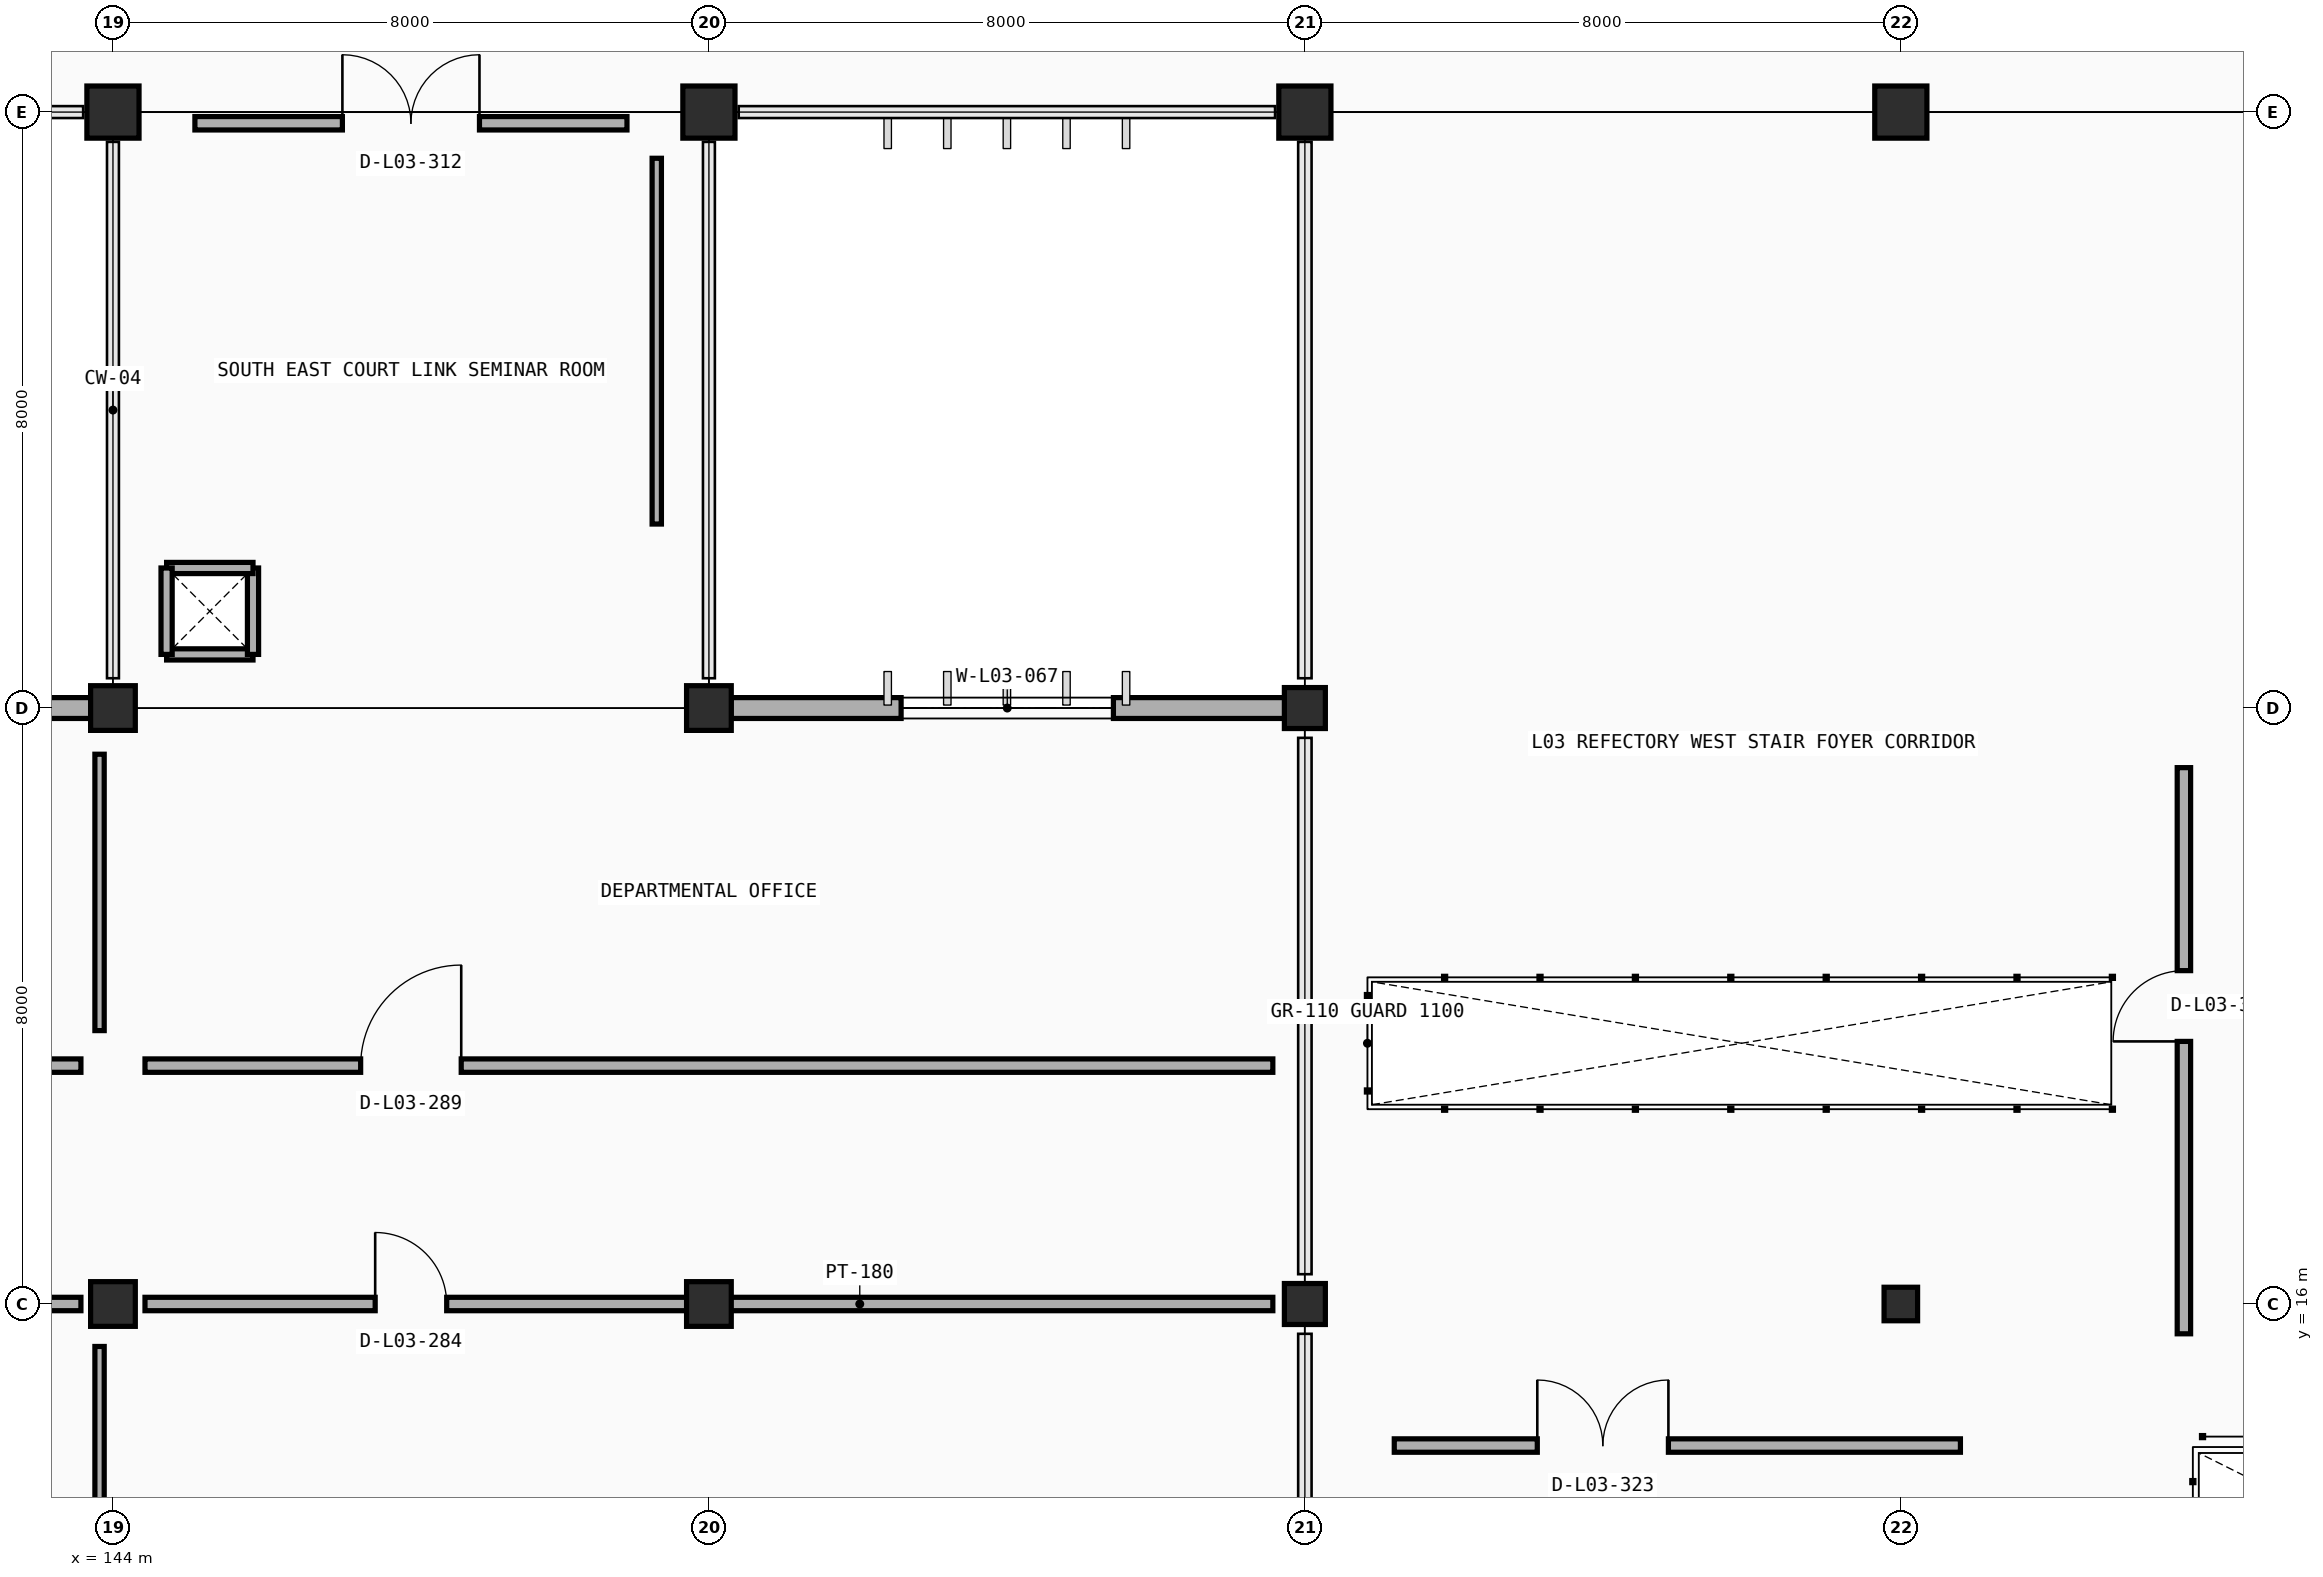
"""IFC4 building model, lengths in metres.
Left out: names, types, materials, properties, quantities, classifications, styles, units other than length and angle.
Written with IfcOpenShell. Run it as: python <this file> out.ifc"""

import sys

from ifc_helpers import new_model, si_unit, direction, frame, frame_2d, origin, origin_2d, place, context, subcontext, project, spatial, rectangle, extrude, element, fill, save


model = new_model("IFC4")
c1 = context("Model", 3, precision=1e-05, world=origin(), true_north=direction((0.0, 1.0)))
c2 = subcontext(c1, "Body", "Model", "MODEL_VIEW")
j1 = project(units=[si_unit("LENGTHUNIT", "METRE"), si_unit("PLANEANGLEUNIT", "RADIAN")], contexts=[c1])
p1 = place(None, origin())
s1 = spatial("IfcSite", under=j1, at=p1, CompositionType="ELEMENT")
p2 = place(p1, origin())
s2 = spatial("IfcBuilding", under=s1, at=p2, CompositionType="ELEMENT")
p3 = place(p2, frame((0.0, 0.0, 9.6)))
s3 = spatial("IfcBuildingStorey", under=s2, at=p3, CompositionType="ELEMENT", Elevation=9.6)
for number, where, z_axis, x_axis in (
    (1, (144.0, 16.0, 0.0), (0.0, 0.0, 1.0), (1.0, 0.0, 0.0)),
    (2, (152.0, 16.0, 0.0), (0.0, 0.0, 1.0), (1.0, 0.0, 0.0)),
):
    element("IfcColumn", number, at=place(p3, frame(where, z_axis=z_axis, x_axis=x_axis)), inside=s3, PredefinedType="COLUMN", context=c2, shape_type="SweptSolid", body=[
        extrude(rectangle(XDim=0.6, YDim=0.6, at=origin_2d()), origin(), (0.0, 0.0, 1.0), 4.2),
    ])
p4 = place(p3, frame((160.0, 16.0, 0.0), z_axis=(0.0, 0.0, 1.0), x_axis=(1.0, 0.0, 0.0)))
e3 = element("IfcColumn", 3, at=p4, inside=s3, PredefinedType="COLUMN", context=c2, shape_type="SweptSolid", body=[
    extrude(rectangle(XDim=0.55, YDim=0.55, at=origin_2d()), origin(), (0.0, 0.0, 1.0), 4.2),
])
p5 = place(p3, frame((168.0, 16.0, 0.0), z_axis=(0.0, 0.0, 1.0), x_axis=(1.0, 0.0, 0.0)))
e4 = element("IfcColumn", 4, at=p5, inside=s3, PredefinedType="COLUMN", context=c2, shape_type="SweptSolid", body=[
    extrude(rectangle(XDim=0.45, YDim=0.45, at=origin_2d()), origin(), (0.0, 0.0, 1.0), 4.2),
])
for number, where, z_axis, x_axis in (
    (5, (144.0, 24.0, 0.0), (0.0, 0.0, 1.0), (1.0, 0.0, 0.0)),
    (6, (152.0, 24.0, 0.0), (0.0, 0.0, 1.0), (1.0, 0.0, 0.0)),
):
    element("IfcColumn", number, at=place(p3, frame(where, z_axis=z_axis, x_axis=x_axis)), inside=s3, PredefinedType="COLUMN", context=c2, shape_type="SweptSolid", body=[
        extrude(rectangle(XDim=0.6, YDim=0.6, at=origin_2d()), origin(), (0.0, 0.0, 1.0), 4.2),
    ])
p6 = place(p3, frame((160.0, 24.0, 0.0), z_axis=(0.0, 0.0, 1.0), x_axis=(1.0, 0.0, 0.0)))
e7 = element("IfcColumn", 7, at=p6, inside=s3, PredefinedType="COLUMN", context=c2, shape_type="SweptSolid", body=[
    extrude(rectangle(XDim=0.55, YDim=0.55, at=origin_2d()), origin(), (0.0, 0.0, 1.0), 4.2),
])
for number, where, z_axis, x_axis in (
    (8, (144.0, 32.0, 0.0), (0.0, 0.0, 1.0), (1.0, 0.0, 0.0)),
    (9, (152.0, 32.0, 0.0), (0.0, 0.0, 1.0), (1.0, 0.0, 0.0)),
    (10, (160.0, 32.0, 0.0), (0.0, 0.0, 1.0), (1.0, 0.0, 0.0)),
    (11, (168.0, 32.0, 0.0), (0.0, 0.0, 1.0), (1.0, 0.0, 0.0)),
):
    element("IfcColumn", number, at=place(p3, frame(where, z_axis=z_axis, x_axis=x_axis)), inside=s3, PredefinedType="COLUMN", context=c2, shape_type="SweptSolid", body=[
        extrude(rectangle(XDim=0.7, YDim=0.7, at=origin_2d()), origin(), (0.0, 0.0, 1.0), 4.2),
    ])
p7 = place(p3, frame((136.297, 24.0, 0.0), z_axis=(0.0, 0.0, 1.0), x_axis=(1.0, 0.0, 0.0)))
e12 = element("IfcWall", 12, at=p7, inside=s3, PredefinedType="STANDARD", context=c2, shape_type="SweptSolid", body=[
    extrude(rectangle(XDim=7.406, YDim=0.28, at=frame_2d((3.703, 0.0))), origin(), (0.0, 0.0, 1.0), 3.325),
])
p8 = place(p7, frame((2.283, 0.0, 0.9)))
e13 = element("IfcOpeningElement", 13, at=p8, cuts=e12, PredefinedType="OPENING", context=c2, shape_type="SweptSolid", body=[
    extrude(rectangle(XDim=1.25, YDim=1.4, at=frame_2d((0.625, 0.7))), frame((0.0, 0.15, 0.0), z_axis=(0.0, -1.0, 0.0), x_axis=(1.0, 0.0, 0.0)), (0.0, 0.0, 1.0), 0.3),
])
p9 = place(p3, frame((152.297, 24.0, 0.0), z_axis=(0.0, 0.0, 1.0), x_axis=(1.0, 0.0, 0.0)))
e14 = element("IfcWall", 14, at=p9, inside=s3, PredefinedType="STANDARD", context=c2, shape_type="SweptSolid", body=[
    extrude(rectangle(XDim=7.431, YDim=0.28, at=frame_2d((3.715, 0.0))), origin(), (0.0, 0.0, 1.0), 3.325),
])
p10 = place(p9, frame((2.283, 0.0, 0.9)))
e15 = element("IfcOpeningElement", 15, at=p10, cuts=e14, PredefinedType="OPENING", context=c2, shape_type="SweptSolid", body=[
    extrude(rectangle(XDim=2.85, YDim=1.25, at=frame_2d((1.425, 0.625))), frame((0.0, 0.15, 0.0), z_axis=(0.0, -1.0, 0.0), x_axis=(1.0, 0.0, 0.0)), (0.0, 0.0, 1.0), 0.3),
])
for number, where, z_axis, x_axis in (
    (16, (144.72, 24.72, 0.0), (0.0, 0.0, 1.0), (1.0, 0.0, 0.0)),
    (17, (145.88, 24.72, 0.0), (0.0, 0.0, 1.0), (0.0, 1.0, 0.0)),
    (18, (145.88, 25.88, 0.0), (0.0, 0.0, 1.0), (-1.0, 0.0, 0.0)),
    (19, (144.72, 25.88, 0.0), (0.0, 0.0, 1.0), (0.0, -1.0, 0.0)),
):
    element("IfcWall", number, at=place(p3, frame(where, z_axis=z_axis, x_axis=x_axis)), inside=s3, PredefinedType="PARTITIONING", context=c2, shape_type="SweptSolid", body=[
        extrude(rectangle(XDim=1.16, YDim=0.15, at=frame_2d((0.58, 0.0))), origin(), (0.0, 0.0, 1.0), 3.9),
    ])
p11 = place(p3, frame((120.43, 16.0, 0.0), z_axis=(0.0, 0.0, 1.0), x_axis=(1.0, 0.0, 0.0)))
e20 = element("IfcWall", 20, at=p11, inside=s3, PredefinedType="PARTITIONING", context=c2, shape_type="SweptSolid", body=[
    extrude(rectangle(XDim=23.14, YDim=0.18, at=frame_2d((11.57, 0.0))), origin(), (0.0, 0.0, 1.0), 3.275),
])
p12 = place(p11, frame((2.66, 0.0, 0.0)))
e21 = element("IfcOpeningElement", 21, at=p12, cuts=e20, PredefinedType="OPENING", context=c2, shape_type="SweptSolid", body=[
    extrude(rectangle(XDim=1.82, YDim=2.25, at=frame_2d((0.91, 1.125))), frame((0.0, 0.1, 0.0), z_axis=(0.0, -1.0, 0.0), x_axis=(1.0, 0.0, 0.0)), (0.0, 0.0, 1.0), 0.2),
])
p13 = place(p3, frame((143.82, 8.62, 0.0), z_axis=(0.0, 0.0, 1.0), x_axis=(0.0, 1.0, 0.0)))
e22 = element("IfcWall", 22, at=p13, inside=s3, PredefinedType="PARTITIONING", context=c2, shape_type="SweptSolid", body=[
    extrude(rectangle(XDim=6.81, YDim=0.125, at=frame_2d((3.405, 0.0))), origin(), (0.0, 0.0, 1.0), 3.225),
])
p14 = place(p3, frame((144.43, 16.0, 0.0), z_axis=(0.0, 0.0, 1.0), x_axis=(1.0, 0.0, 0.0)))
e23 = element("IfcWall", 23, at=p14, inside=s3, PredefinedType="PARTITIONING", context=c2, shape_type="SweptSolid", body=[
    extrude(rectangle(XDim=15.14, YDim=0.18, at=frame_2d((7.57, 0.0))), origin(), (0.0, 0.0, 1.0), 3.275),
])
p15 = place(p14, frame((3.09, 0.0, 0.0)))
e24 = element("IfcOpeningElement", 24, at=p15, cuts=e23, PredefinedType="OPENING", context=c2, shape_type="SweptSolid", body=[
    extrude(rectangle(XDim=0.96, YDim=2.15, at=frame_2d((0.48, 1.075))), frame((0.0, 0.1, 0.0), z_axis=(0.0, -1.0, 0.0), x_axis=(1.0, 0.0, 0.0)), (0.0, 0.0, 1.0), 0.2),
])
p16 = place(p3, frame((120.43, 19.2, 0.0), z_axis=(0.0, 0.0, 1.0), x_axis=(1.0, 0.0, 0.0)))
e25 = element("IfcWall", 25, at=p16, inside=s3, PredefinedType="PARTITIONING", context=c2, shape_type="SweptSolid", body=[
    extrude(rectangle(XDim=23.14, YDim=0.18, at=frame_2d((11.57, 0.0))), origin(), (0.0, 0.0, 1.0), 3.3),
])
p17 = place(p16, frame((2.74, 0.0, 0.0)))
e26 = element("IfcOpeningElement", 26, at=p17, cuts=e25, PredefinedType="OPENING", context=c2, shape_type="SweptSolid", body=[
    extrude(rectangle(XDim=1.66, YDim=2.22, at=frame_2d((0.83, 1.11))), frame((0.0, 0.1, 0.0), z_axis=(0.0, -1.0, 0.0), x_axis=(1.0, 0.0, 0.0)), (0.0, 0.0, 1.0), 0.2),
])
p18 = place(p3, frame((143.82, 19.67, 0.0), z_axis=(0.0, 0.0, 1.0), x_axis=(0.0, 1.0, 0.0)))
e27 = element("IfcWall", 27, at=p18, inside=s3, PredefinedType="PARTITIONING", context=c2, shape_type="SweptSolid", body=[
    extrude(rectangle(XDim=3.71, YDim=0.125, at=frame_2d((1.855, 0.0))), origin(), (0.0, 0.0, 1.0), 3.225),
])
p19 = place(p3, frame((144.43, 19.2, 0.0), z_axis=(0.0, 0.0, 1.0), x_axis=(1.0, 0.0, 0.0)))
e28 = element("IfcWall", 28, at=p19, inside=s3, PredefinedType="PARTITIONING", context=c2, shape_type="SweptSolid", body=[
    extrude(rectangle(XDim=15.14, YDim=0.18, at=frame_2d((7.57, 0.0))), origin(), (0.0, 0.0, 1.0), 3.3),
])
p20 = place(p19, frame((2.895, 0.0, 0.0)))
e29 = element("IfcOpeningElement", 29, at=p20, cuts=e28, PredefinedType="OPENING", context=c2, shape_type="SweptSolid", body=[
    extrude(rectangle(XDim=1.35, YDim=2.2, at=frame_2d((0.675, 1.1))), frame((0.0, 0.1, 0.0), z_axis=(0.0, -1.0, 0.0), x_axis=(1.0, 0.0, 0.0)), (0.0, 0.0, 1.0), 0.2),
])
p21 = place(p3, frame((145.1, 31.85, 0.0), z_axis=(0.0, 0.0, 1.0), x_axis=(1.0, 0.0, 0.0)))
e30 = element("IfcWall", 30, at=p21, inside=s3, PredefinedType="PARTITIONING", context=c2, shape_type="SweptSolid", body=[
    extrude(rectangle(XDim=5.8, YDim=0.18, at=frame_2d((2.9, 0.0))), origin(), (0.0, 0.0, 1.0), 3.3),
])
p22 = place(p21, frame((1.98, 0.0, 0.0)))
e31 = element("IfcOpeningElement", 31, at=p22, cuts=e30, PredefinedType="OPENING", context=c2, shape_type="SweptSolid", body=[
    extrude(rectangle(XDim=1.84, YDim=2.25, at=frame_2d((0.92, 1.125))), frame((0.0, 0.1, 0.0), z_axis=(0.0, -1.0, 0.0), x_axis=(1.0, 0.0, 0.0)), (0.0, 0.0, 1.0), 0.2),
])
p23 = place(p3, frame((151.3, 26.47, 0.0), z_axis=(0.0, 0.0, 1.0), x_axis=(0.0, 1.0, 0.0)))
e32 = element("IfcWall", 32, at=p23, inside=s3, PredefinedType="PARTITIONING", context=c2, shape_type="SweptSolid", body=[
    extrude(rectangle(XDim=4.91, YDim=0.125, at=frame_2d((2.455, 0.0))), origin(), (0.0, 0.0, 1.0), 3.3),
])
p24 = place(p3, frame((171.8, 15.6, 0.0), z_axis=(0.0, 0.0, 1.0), x_axis=(0.0, 1.0, 0.0)))
e33 = element("IfcWall", 33, at=p24, inside=s3, PredefinedType="PARTITIONING", context=c2, shape_type="SweptSolid", body=[
    extrude(rectangle(XDim=7.6, YDim=0.18, at=frame_2d((3.8, 0.0))), origin(), (0.0, 0.0, 1.0), 3.3),
])
p25 = place(p24, frame((3.925, 0.0, 0.0)))
e34 = element("IfcOpeningElement", 34, at=p25, cuts=e33, PredefinedType="OPENING", context=c2, shape_type="SweptSolid", body=[
    extrude(rectangle(XDim=0.95, YDim=2.1, at=frame_2d((0.475, 1.05))), frame((0.0, 0.1, 0.0), z_axis=(0.0, -1.0, 0.0), x_axis=(1.0, 0.0, 0.0)), (0.0, 0.0, 1.0), 0.2),
])
p26 = place(p3, frame((161.2, 14.1, 0.0), z_axis=(0.0, 0.0, 1.0), x_axis=(1.0, 0.0, 0.0)))
e35 = element("IfcWall", 35, at=p26, inside=s3, PredefinedType="PARTITIONING", context=c2, shape_type="SweptSolid", body=[
    extrude(rectangle(XDim=7.6, YDim=0.18, at=frame_2d((3.8, 0.0))), origin(), (0.0, 0.0, 1.0), 3.3),
])
p27 = place(p26, frame((1.92, 0.0, 0.0)))
e36 = element("IfcOpeningElement", 36, at=p27, cuts=e35, PredefinedType="OPENING", context=c2, shape_type="SweptSolid", body=[
    extrude(rectangle(XDim=1.76, YDim=2.25, at=frame_2d((0.88, 1.125))), frame((0.0, 0.1, 0.0), z_axis=(0.0, -1.0, 0.0), x_axis=(1.0, 0.0, 0.0)), (0.0, 0.0, 1.0), 0.2),
])
p28 = place(p10, origin())
e37 = element("IfcWindow", 37, at=p28, inside=s3, PartitioningType="DOUBLE_PANEL_VERTICAL", PredefinedType="WINDOW", context=c2, shape_type="SweptSolid", body=[
    extrude(rectangle(XDim=2.85, YDim=1.25, at=frame_2d((1.425, 0.625))), frame((0.0, 0.03, 0.0), z_axis=(0.0, -1.0, 0.0), x_axis=(1.0, 0.0, 0.0)), (0.0, 0.0, 1.0), 0.06),
])
fill(e15, e37)
p29 = place(p15, origin())
e38 = element("IfcDoor", 38, at=p29, inside=s3, OperationType="SINGLE_SWING_LEFT", PredefinedType="DOOR", context=c2, shape_type="SweptSolid", body=[
    extrude(rectangle(XDim=0.96, YDim=2.15, at=frame_2d((0.48, 1.075))), frame((0.0, 0.025, 0.0), z_axis=(0.0, -1.0, 0.0), x_axis=(1.0, 0.0, 0.0)), (0.0, 0.0, 1.0), 0.05),
])
fill(e24, e38)
p30 = place(p20, origin())
e39 = element("IfcDoor", 39, at=p30, inside=s3, OperationType="SINGLE_SWING_RIGHT", PredefinedType="DOOR", context=c2, shape_type="SweptSolid", body=[
    extrude(rectangle(XDim=1.35, YDim=2.2, at=frame_2d((0.675, 1.1))), frame((0.0, 0.025, 0.0), z_axis=(0.0, -1.0, 0.0), x_axis=(1.0, 0.0, 0.0)), (0.0, 0.0, 1.0), 0.05),
])
fill(e29, e39)
p31 = place(p22, origin())
e40 = element("IfcDoor", 40, at=p31, inside=s3, OperationType="DOUBLE_DOOR_SINGLE_SWING", PredefinedType="DOOR", context=c2, shape_type="SweptSolid", body=[
    extrude(rectangle(XDim=1.84, YDim=2.25, at=frame_2d((0.92, 1.125))), frame((0.0, 0.025, 0.0), z_axis=(0.0, -1.0, 0.0), x_axis=(1.0, 0.0, 0.0)), (0.0, 0.0, 1.0), 0.05),
])
fill(e31, e40)
p32 = place(p25, origin())
e41 = element("IfcDoor", 41, at=p32, inside=s3, OperationType="SINGLE_SWING_LEFT", PredefinedType="DOOR", context=c2, shape_type="SweptSolid", body=[
    extrude(rectangle(XDim=0.95, YDim=2.1, at=frame_2d((0.475, 1.05))), frame((0.0, 0.025, 0.0), z_axis=(0.0, -1.0, 0.0), x_axis=(1.0, 0.0, 0.0)), (0.0, 0.0, 1.0), 0.05),
])
fill(e34, e41)
p33 = place(p27, origin())
e42 = element("IfcDoor", 42, at=p33, inside=s3, OperationType="DOUBLE_DOOR_SINGLE_SWING", PredefinedType="DOOR", context=c2, shape_type="SweptSolid", body=[
    extrude(rectangle(XDim=1.76, YDim=2.25, at=frame_2d((0.88, 1.125))), frame((0.0, 0.025, 0.0), z_axis=(0.0, -1.0, 0.0), x_axis=(1.0, 0.0, 0.0)), (0.0, 0.0, 1.0), 0.05),
])
fill(e36, e42)
save(model, sys.argv[1])
